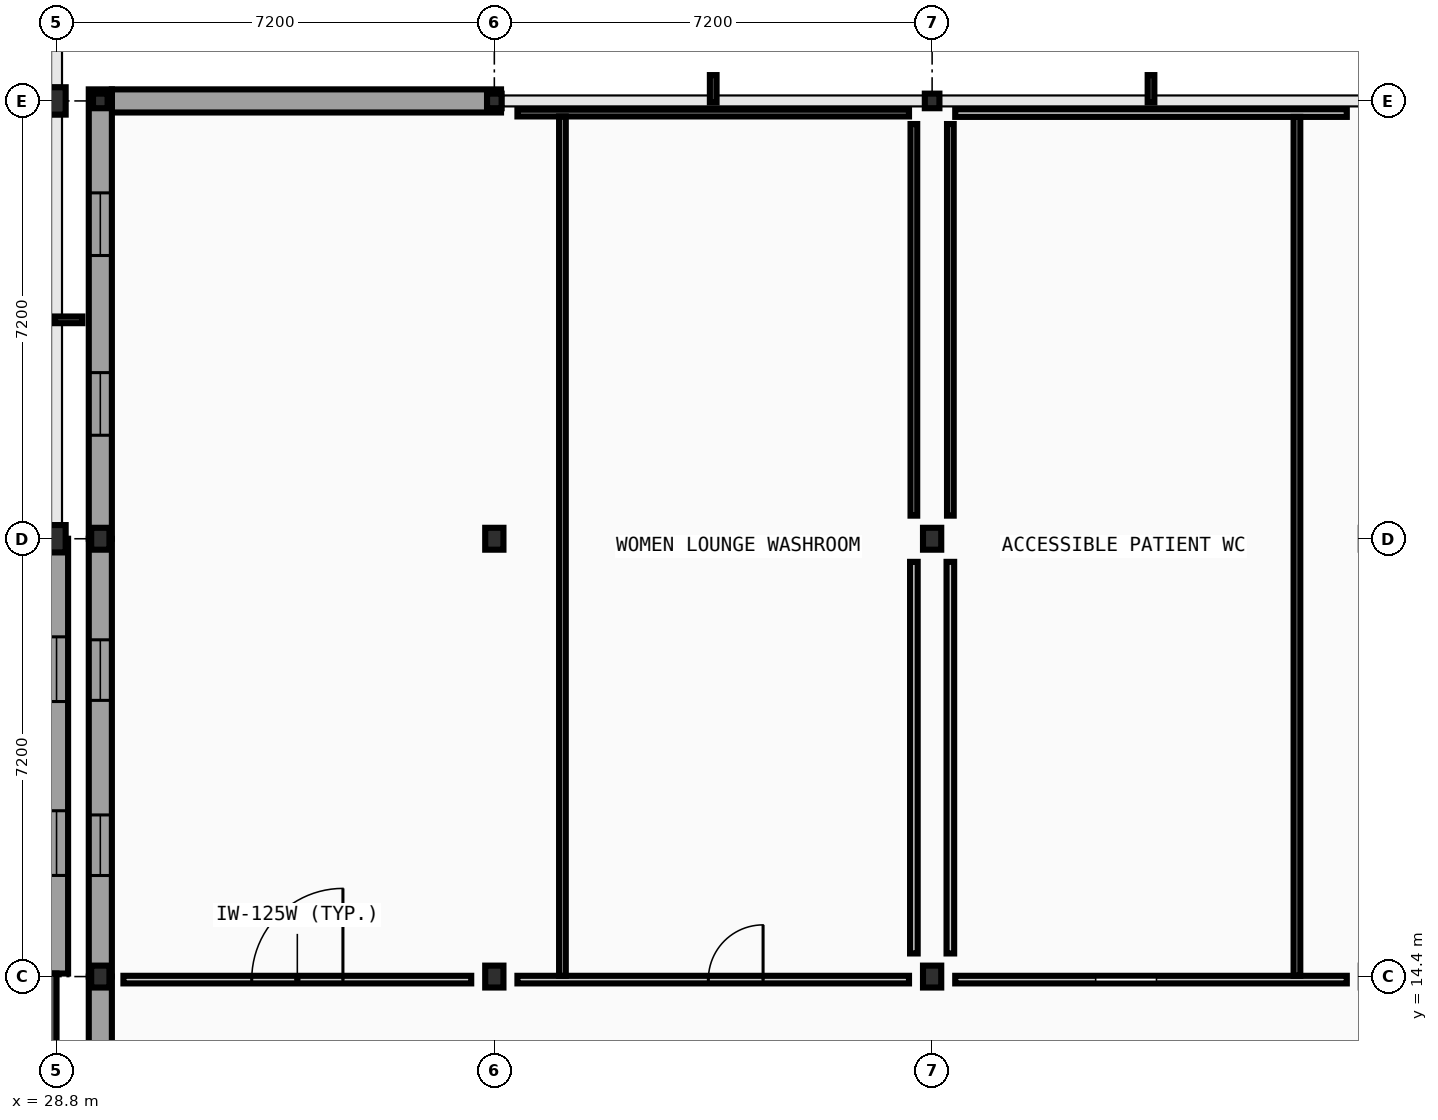
"""IFC4 building model, lengths in metres.
Left out: names, types, materials, properties, quantities, classifications, styles, units other than length and angle.
Written with IfcOpenShell. Run it as: python <this file> out.ifc"""

import sys

from ifc_helpers import new_model, si_unit, direction, frame, frame_2d, origin, origin_2d, place, context, subcontext, project, spatial, rectangle, i_section, extrude, element, fill, save


model = new_model("IFC4")
c1 = context("Model", 3, precision=1e-05, world=origin(), true_north=direction((0.0, 1.0)))
c2 = subcontext(c1, "Body", "Model", "MODEL_VIEW")
j1 = project(units=[si_unit("LENGTHUNIT", "METRE"), si_unit("PLANEANGLEUNIT", "RADIAN")], contexts=[c1])
p1 = place(None, origin())
s1 = spatial("IfcSite", under=j1, at=p1, CompositionType="ELEMENT")
p2 = place(p1, origin())
s2 = spatial("IfcBuilding", under=s1, at=p2, CompositionType="ELEMENT")
p3 = place(p2, frame((0.0, 0.0, 9.6)))
s3 = spatial("IfcBuildingStorey", under=s2, at=p3, CompositionType="ELEMENT", Elevation=9.6)
for number, where, z_axis, x_axis in (
    (1, (28.8, 21.6, 0.0), (0.0, 0.0, 1.0), (1.0, 0.0, 0.0)),
    (2, (28.8, 28.8, 0.0), (0.0, 0.0, 1.0), (1.0, 0.0, 0.0)),
):
    element("IfcColumn", number, at=place(p3, frame(where, z_axis=z_axis, x_axis=x_axis)), inside=s3, PredefinedType="COLUMN", context=c2, shape_type="SweptSolid", body=[
        extrude(i_section(OverallWidth=0.3, OverallDepth=0.45, WebThickness=0.014, FlangeThickness=0.026, FilletRadius=0.027, at=origin_2d()), origin(), (0.0, 0.0, 1.0), 4.4),
    ])
for number, where, z_axis, x_axis in (
    (3, (29.52, 14.4, 0.0), (0.0, 0.0, 1.0), (1.0, 0.0, 0.0)),
    (4, (29.52, 21.6, 0.0), (0.0, 0.0, 1.0), (1.0, 0.0, 0.0)),
):
    element("IfcColumn", number, at=place(p3, frame(where, z_axis=z_axis, x_axis=x_axis)), inside=s3, PredefinedType="COLUMN", context=c2, shape_type="SweptSolid", body=[
        extrude(i_section(OverallWidth=0.3, OverallDepth=0.36, WebThickness=0.012, FlangeThickness=0.022, FilletRadius=0.027, at=origin_2d()), origin(), (0.0, 0.0, 1.0), 4.4),
    ])
p4 = place(p3, frame((29.52, 28.8, 0.0), z_axis=(0.0, 0.0, 1.0), x_axis=(1.0, 0.0, 0.0)))
e5 = element("IfcColumn", 5, at=p4, inside=s3, PredefinedType="COLUMN", context=c2, shape_type="SweptSolid", body=[
    extrude(i_section(OverallWidth=0.24, OverallDepth=0.24, WebThickness=0.01, FlangeThickness=0.017, FilletRadius=0.021, at=origin_2d()), origin(), (0.0, 0.0, 1.0), 4.4),
])
for number, where, z_axis, x_axis in (
    (6, (36.0, 14.4, 0.0), (0.0, 0.0, 1.0), (1.0, 0.0, 0.0)),
    (7, (36.0, 21.6, 0.0), (0.0, 0.0, 1.0), (1.0, 0.0, 0.0)),
):
    element("IfcColumn", number, at=place(p3, frame(where, z_axis=z_axis, x_axis=x_axis)), inside=s3, PredefinedType="COLUMN", context=c2, shape_type="SweptSolid", body=[
        extrude(i_section(OverallWidth=0.3, OverallDepth=0.36, WebThickness=0.012, FlangeThickness=0.022, FilletRadius=0.027, at=origin_2d()), origin(), (0.0, 0.0, 1.0), 4.4),
    ])
p5 = place(p3, frame((36.0, 28.8, 0.0), z_axis=(0.0, 0.0, 1.0), x_axis=(1.0, 0.0, 0.0)))
e8 = element("IfcColumn", 8, at=p5, inside=s3, PredefinedType="COLUMN", context=c2, shape_type="SweptSolid", body=[
    extrude(i_section(OverallWidth=0.24, OverallDepth=0.24, WebThickness=0.01, FlangeThickness=0.017, FilletRadius=0.021, at=origin_2d()), origin(), (0.0, 0.0, 1.0), 4.4),
])
for number, where, z_axis, x_axis in (
    (9, (43.2, 14.4, 0.0), (0.0, 0.0, 1.0), (1.0, 0.0, 0.0)),
    (10, (43.2, 21.6, 0.0), (0.0, 0.0, 1.0), (1.0, 0.0, 0.0)),
):
    element("IfcColumn", number, at=place(p3, frame(where, z_axis=z_axis, x_axis=x_axis)), inside=s3, PredefinedType="COLUMN", context=c2, shape_type="SweptSolid", body=[
        extrude(i_section(OverallWidth=0.3, OverallDepth=0.36, WebThickness=0.012, FlangeThickness=0.022, FilletRadius=0.027, at=origin_2d()), origin(), (0.0, 0.0, 1.0), 4.4),
    ])
p6 = place(p3, frame((43.2, 28.8, 0.0), z_axis=(0.0, 0.0, 1.0), x_axis=(1.0, 0.0, 0.0)))
e11 = element("IfcColumn", 11, at=p6, inside=s3, PredefinedType="COLUMN", context=c2, shape_type="SweptSolid", body=[
    extrude(i_section(OverallWidth=0.24, OverallDepth=0.24, WebThickness=0.01, FlangeThickness=0.017, FilletRadius=0.021, at=origin_2d()), origin(), (0.0, 0.0, 1.0), 4.4),
])
p7 = place(p3, frame((28.8, 14.45, 0.0), z_axis=(0.0, 0.0, 1.0), x_axis=(0.0, 1.0, 0.0)))
e12 = element("IfcWall", 12, at=p7, inside=s3, PredefinedType="STANDARD", context=c2, shape_type="SweptSolid", body=[
    extrude(rectangle(XDim=7.15, YDim=0.38, at=frame_2d((3.575, 0.0))), origin(), (0.0, 0.0, 1.0), 4.2),
])
p8 = place(p7, frame((1.613, 0.0, 0.95)))
e13 = element("IfcOpeningElement", 13, at=p8, cuts=e12, PredefinedType="OPENING", context=c2, shape_type="SweptSolid", body=[
    extrude(rectangle(XDim=1.064, YDim=1.332, at=frame_2d((0.532, 0.666))), frame((0.0, 0.2, 0.0), z_axis=(0.0, -1.0, 0.0), x_axis=(1.0, 0.0, 0.0)), (0.0, 0.0, 1.0), 0.4),
])
p9 = place(p7, frame((4.473, 0.0, 0.95)))
e14 = element("IfcOpeningElement", 14, at=p9, cuts=e12, PredefinedType="OPENING", context=c2, shape_type="SweptSolid", body=[
    extrude(rectangle(XDim=1.064, YDim=1.332, at=frame_2d((0.532, 0.666))), frame((0.0, 0.2, 0.0), z_axis=(0.0, -1.0, 0.0), x_axis=(1.0, 0.0, 0.0)), (0.0, 0.0, 1.0), 0.4),
])
p10 = place(p3, frame((36.11, 28.8, 0.0), z_axis=(0.0, 0.0, 1.0), x_axis=(-1.0, 0.0, 0.0)))
e15 = element("IfcWall", 15, at=p10, inside=s3, PredefinedType="STANDARD", context=c2, shape_type="SweptSolid", body=[
    extrude(rectangle(XDim=6.4, YDim=0.38, at=frame_2d((3.2, 0.0))), origin(), (0.0, 0.0, 1.0), 3.9),
])
p11 = place(p3, frame((29.52, 14.4, 0.0), z_axis=(0.0, 0.0, 1.0), x_axis=(0.0, -1.0, 0.0)))
e16 = element("IfcWall", 16, at=p11, inside=s3, PredefinedType="STANDARD", context=c2, shape_type="SweptSolid", body=[
    extrude(rectangle(XDim=5.5, YDim=0.38, at=frame_2d((2.75, 0.0))), origin(), (0.0, 0.0, 1.0), 4.2),
])
p12 = place(p3, frame((29.52, 21.6, 0.0), z_axis=(0.0, 0.0, 1.0), x_axis=(0.0, -1.0, 0.0)))
e17 = element("IfcWall", 17, at=p12, inside=s3, PredefinedType="STANDARD", context=c2, shape_type="SweptSolid", body=[
    extrude(rectangle(XDim=7.2, YDim=0.38, at=frame_2d((3.6, 0.0))), origin(), (0.0, 0.0, 1.0), 3.895),
])
p13 = place(p12, frame((1.662, 0.0, 0.95)))
e18 = element("IfcOpeningElement", 18, at=p13, cuts=e17, PredefinedType="OPENING", context=c2, shape_type="SweptSolid", body=[
    extrude(rectangle(XDim=0.996, YDim=1.368, at=frame_2d((0.498, 0.684))), frame((0.0, 0.2, 0.0), z_axis=(0.0, -1.0, 0.0), x_axis=(1.0, 0.0, 0.0)), (0.0, 0.0, 1.0), 0.4),
])
p14 = place(p12, frame((4.542, 0.0, 0.95)))
e19 = element("IfcOpeningElement", 19, at=p14, cuts=e17, PredefinedType="OPENING", context=c2, shape_type="SweptSolid", body=[
    extrude(rectangle(XDim=0.996, YDim=1.368, at=frame_2d((0.498, 0.684))), frame((0.0, 0.2, 0.0), z_axis=(0.0, -1.0, 0.0), x_axis=(1.0, 0.0, 0.0)), (0.0, 0.0, 1.0), 0.4),
])
p15 = place(p3, frame((29.52, 28.99, 0.0), z_axis=(0.0, 0.0, 1.0), x_axis=(0.0, -1.0, 0.0)))
e20 = element("IfcWall", 20, at=p15, inside=s3, PredefinedType="STANDARD", context=c2, shape_type="SweptSolid", body=[
    extrude(rectangle(XDim=7.39, YDim=0.38, at=frame_2d((3.695, 0.0))), origin(), (0.0, 0.0, 1.0), 3.9),
])
p16 = place(p15, frame((1.702, 0.0, 0.95)))
e21 = element("IfcOpeningElement", 21, at=p16, cuts=e20, PredefinedType="OPENING", context=c2, shape_type="SweptSolid", body=[
    extrude(rectangle(XDim=1.03, YDim=1.368, at=frame_2d((0.515, 0.684))), frame((0.0, 0.2, 0.0), z_axis=(0.0, -1.0, 0.0), x_axis=(1.0, 0.0, 0.0)), (0.0, 0.0, 1.0), 0.4),
])
p17 = place(p15, frame((4.658, 0.0, 0.95)))
e22 = element("IfcOpeningElement", 22, at=p17, cuts=e20, PredefinedType="OPENING", context=c2, shape_type="SweptSolid", body=[
    extrude(rectangle(XDim=1.03, YDim=1.368, at=frame_2d((0.515, 0.684))), frame((0.0, 0.2, 0.0), z_axis=(0.0, -1.0, 0.0), x_axis=(1.0, 0.0, 0.0)), (0.0, 0.0, 1.0), 0.4),
])
p18 = place(p3, frame((28.6, 5.85, 0.0), z_axis=(0.0, 0.0, 1.0), x_axis=(0.0, 1.0, 0.0)))
e23 = element("IfcWall", 23, at=p18, inside=s3, PredefinedType="SHEAR", context=c2, shape_type="SweptSolid", body=[
    extrude(rectangle(XDim=8.6, YDim=0.4, at=frame_2d((4.3, 0.0))), origin(), (0.0, 0.0, 1.0), 4.2),
])
p19 = place(p3, frame((29.9, 14.35, 0.0), z_axis=(0.0, 0.0, 1.0), x_axis=(1.0, 0.0, 0.0)))
e24 = element("IfcWall", 24, at=p19, inside=s3, PredefinedType="PARTITIONING", context=c2, shape_type="SweptSolid", body=[
    extrude(rectangle(XDim=5.72, YDim=0.125, at=frame_2d((2.86, 0.0))), origin(), (0.0, 0.0, 1.0), 3.895),
])
p20 = place(p19, frame((2.11, 0.0, 0.0)))
e25 = element("IfcOpeningElement", 25, at=p20, cuts=e24, PredefinedType="OPENING", context=c2, shape_type="SweptSolid", body=[
    extrude(rectangle(XDim=1.5, YDim=2.2, at=frame_2d((0.75, 1.1))), frame((0.0, 0.073, 0.0), z_axis=(0.0, -1.0, 0.0), x_axis=(1.0, 0.0, 0.0)), (0.0, 0.0, 1.0), 0.145),
])
p21 = place(p3, frame((36.38, 14.35, 0.0), z_axis=(0.0, 0.0, 1.0), x_axis=(1.0, 0.0, 0.0)))
e26 = element("IfcWall", 26, at=p21, inside=s3, PredefinedType="PARTITIONING", context=c2, shape_type="SweptSolid", body=[
    extrude(rectangle(XDim=6.44, YDim=0.125, at=frame_2d((3.22, 0.0))), origin(), (0.0, 0.0, 1.0), 3.895),
])
p22 = place(p21, frame((3.14, 0.0, 0.0)))
e27 = element("IfcOpeningElement", 27, at=p22, cuts=e26, PredefinedType="OPENING", context=c2, shape_type="SweptSolid", body=[
    extrude(rectangle(XDim=0.9, YDim=2.1, at=frame_2d((0.45, 1.05))), frame((0.0, 0.073, 0.0), z_axis=(0.0, -1.0, 0.0), x_axis=(1.0, 0.0, 0.0)), (0.0, 0.0, 1.0), 0.145),
])
p23 = place(p3, frame((43.58, 14.35, 0.0), z_axis=(0.0, 0.0, 1.0), x_axis=(1.0, 0.0, 0.0)))
e28 = element("IfcWall", 28, at=p23, inside=s3, PredefinedType="PARTITIONING", context=c2, shape_type="SweptSolid", body=[
    extrude(rectangle(XDim=6.44, YDim=0.125, at=frame_2d((3.22, 0.0))), origin(), (0.0, 0.0, 1.0), 3.895),
])
p24 = place(p23, frame((2.31, 0.0, 0.0)))
e29 = element("IfcOpeningElement", 29, at=p24, cuts=e28, PredefinedType="OPENING", context=c2, shape_type="SweptSolid", body=[
    extrude(rectangle(XDim=1.0, YDim=2.1, at=frame_2d((0.5, 1.05))), frame((0.0, 0.073, 0.0), z_axis=(0.0, -1.0, 0.0), x_axis=(1.0, 0.0, 0.0)), (0.0, 0.0, 1.0), 0.145),
])
p25 = place(p3, frame((36.38, 28.6, 0.0), z_axis=(0.0, 0.0, 1.0), x_axis=(1.0, 0.0, 0.0)))
e30 = element("IfcWall", 30, at=p25, inside=s3, PredefinedType="PARTITIONING", context=c2, shape_type="SweptSolid", body=[
    extrude(rectangle(XDim=6.44, YDim=0.11, at=frame_2d((3.22, 0.0))), origin(), (0.0, 0.0, 1.0), 3.9),
])
p26 = place(p3, frame((43.58, 28.6, 0.0), z_axis=(0.0, 0.0, 1.0), x_axis=(1.0, 0.0, 0.0)))
e31 = element("IfcWall", 31, at=p26, inside=s3, PredefinedType="PARTITIONING", context=c2, shape_type="SweptSolid", body=[
    extrude(rectangle(XDim=6.44, YDim=0.125, at=frame_2d((3.22, 0.0))), origin(), (0.0, 0.0, 1.0), 3.9),
])
p27 = place(p3, frame((37.12, 14.413, 0.0), z_axis=(0.0, 0.0, 1.0), x_axis=(0.0, 1.0, 0.0)))
e32 = element("IfcWall", 32, at=p27, inside=s3, PredefinedType="PARTITIONING", context=c2, shape_type="SweptSolid", body=[
    extrude(rectangle(XDim=14.132, YDim=0.11, at=frame_2d((7.066, 0.0))), origin(), (0.0, 0.0, 1.0), 4.2),
])
p28 = place(p3, frame((42.9, 14.78, 0.0), z_axis=(0.0, 0.0, 1.0), x_axis=(0.0, 1.0, 0.0)))
e33 = element("IfcWall", 33, at=p28, inside=s3, PredefinedType="PARTITIONING", context=c2, shape_type="SweptSolid", body=[
    extrude(rectangle(XDim=6.44, YDim=0.125, at=frame_2d((3.22, 0.0))), origin(), (0.0, 0.0, 1.0), 4.2),
])
p29 = place(p3, frame((42.9, 21.98, 0.0), z_axis=(0.0, 0.0, 1.0), x_axis=(0.0, 1.0, 0.0)))
e34 = element("IfcWall", 34, at=p29, inside=s3, PredefinedType="PARTITIONING", context=c2, shape_type="SweptSolid", body=[
    extrude(rectangle(XDim=6.44, YDim=0.11, at=frame_2d((3.22, 0.0))), origin(), (0.0, 0.0, 1.0), 4.2),
])
p30 = place(p3, frame((43.5, 14.78, 0.0), z_axis=(0.0, 0.0, 1.0), x_axis=(0.0, 1.0, 0.0)))
e35 = element("IfcWall", 35, at=p30, inside=s3, PredefinedType="PARTITIONING", context=c2, shape_type="SweptSolid", body=[
    extrude(rectangle(XDim=6.44, YDim=0.125, at=frame_2d((3.22, 0.0))), origin(), (0.0, 0.0, 1.0), 4.2),
])
p31 = place(p3, frame((43.5, 21.98, 0.0), z_axis=(0.0, 0.0, 1.0), x_axis=(0.0, 1.0, 0.0)))
e36 = element("IfcWall", 36, at=p31, inside=s3, PredefinedType="PARTITIONING", context=c2, shape_type="SweptSolid", body=[
    extrude(rectangle(XDim=6.44, YDim=0.11, at=frame_2d((3.22, 0.0))), origin(), (0.0, 0.0, 1.0), 4.2),
])
p32 = place(p3, frame((49.2, 14.413, 0.0), z_axis=(0.0, 0.0, 1.0), x_axis=(0.0, 1.0, 0.0)))
e37 = element("IfcWall", 37, at=p32, inside=s3, PredefinedType="PARTITIONING", context=c2, shape_type="SweptSolid", body=[
    extrude(rectangle(XDim=14.125, YDim=0.11, at=frame_2d((7.062, 0.0))), origin(), (0.0, 0.0, 1.0), 4.2),
])
p33 = place(p8, origin())
e38 = element("IfcWindow", 38, at=p33, inside=s3, PartitioningType="SINGLE_PANEL", PredefinedType="WINDOW", context=c2, shape_type="SweptSolid", body=[
    extrude(rectangle(XDim=1.064, YDim=1.332, at=frame_2d((0.532, 0.666))), frame((0.0, 0.03, 0.0), z_axis=(0.0, -1.0, 0.0), x_axis=(1.0, 0.0, 0.0)), (0.0, 0.0, 1.0), 0.06),
])
fill(e13, e38)
p34 = place(p9, origin())
e39 = element("IfcWindow", 39, at=p34, inside=s3, PartitioningType="SINGLE_PANEL", PredefinedType="WINDOW", context=c2, shape_type="SweptSolid", body=[
    extrude(rectangle(XDim=1.064, YDim=1.332, at=frame_2d((0.532, 0.666))), frame((0.0, 0.03, 0.0), z_axis=(0.0, -1.0, 0.0), x_axis=(1.0, 0.0, 0.0)), (0.0, 0.0, 1.0), 0.06),
])
fill(e14, e39)
p35 = place(p13, origin())
e40 = element("IfcWindow", 40, at=p35, inside=s3, PartitioningType="SINGLE_PANEL", PredefinedType="WINDOW", context=c2, shape_type="SweptSolid", body=[
    extrude(rectangle(XDim=0.996, YDim=1.368, at=frame_2d((0.498, 0.684))), frame((0.0, 0.03, 0.0), z_axis=(0.0, -1.0, 0.0), x_axis=(1.0, 0.0, 0.0)), (0.0, 0.0, 1.0), 0.06),
])
fill(e18, e40)
p36 = place(p14, origin())
e41 = element("IfcWindow", 41, at=p36, inside=s3, PartitioningType="SINGLE_PANEL", PredefinedType="WINDOW", context=c2, shape_type="SweptSolid", body=[
    extrude(rectangle(XDim=0.996, YDim=1.368, at=frame_2d((0.498, 0.684))), frame((0.0, 0.03, 0.0), z_axis=(0.0, -1.0, 0.0), x_axis=(1.0, 0.0, 0.0)), (0.0, 0.0, 1.0), 0.06),
])
fill(e19, e41)
p37 = place(p16, origin())
e42 = element("IfcWindow", 42, at=p37, inside=s3, PartitioningType="SINGLE_PANEL", PredefinedType="WINDOW", context=c2, shape_type="SweptSolid", body=[
    extrude(rectangle(XDim=1.03, YDim=1.368, at=frame_2d((0.515, 0.684))), frame((0.0, 0.03, 0.0), z_axis=(0.0, -1.0, 0.0), x_axis=(1.0, 0.0, 0.0)), (0.0, 0.0, 1.0), 0.06),
])
fill(e21, e42)
p38 = place(p17, origin())
e43 = element("IfcWindow", 43, at=p38, inside=s3, PartitioningType="SINGLE_PANEL", PredefinedType="WINDOW", context=c2, shape_type="SweptSolid", body=[
    extrude(rectangle(XDim=1.03, YDim=1.368, at=frame_2d((0.515, 0.684))), frame((0.0, 0.03, 0.0), z_axis=(0.0, -1.0, 0.0), x_axis=(1.0, 0.0, 0.0)), (0.0, 0.0, 1.0), 0.06),
])
fill(e22, e43)
p39 = place(p24, frame((1.0, 0.0, 0.0), z_axis=(0.0, 0.0, 1.0), x_axis=(-1.0, 0.0, 0.0)))
e44 = element("IfcDoor", 44, at=p39, inside=s3, OperationType="SLIDING_TO_LEFT", PredefinedType="DOOR", context=c2, shape_type="SweptSolid", body=[
    extrude(rectangle(XDim=1.0, YDim=2.1, at=frame_2d((0.5, 1.05))), frame((0.0, 0.025, 0.0), z_axis=(0.0, -1.0, 0.0), x_axis=(1.0, 0.0, 0.0)), (0.0, 0.0, 1.0), 0.05),
])
fill(e29, e44)
p40 = place(p22, frame((0.9, 0.0, 0.0), z_axis=(0.0, 0.0, 1.0), x_axis=(-1.0, 0.0, 0.0)))
e45 = element("IfcDoor", 45, at=p40, inside=s3, OperationType="SINGLE_SWING_RIGHT", PredefinedType="DOOR", context=c2, shape_type="SweptSolid", body=[
    extrude(rectangle(XDim=0.9, YDim=2.1, at=frame_2d((0.45, 1.05))), frame((0.0, 0.025, 0.0), z_axis=(0.0, -1.0, 0.0), x_axis=(1.0, 0.0, 0.0)), (0.0, 0.0, 1.0), 0.05),
])
fill(e27, e45)
p41 = place(p20, frame((1.5, 0.0, 0.0), z_axis=(0.0, 0.0, 1.0), x_axis=(-1.0, 0.0, 0.0)))
e46 = element("IfcDoor", 46, at=p41, inside=s3, OperationType="DOUBLE_DOOR_SINGLE_SWING", PredefinedType="DOOR", context=c2, shape_type="SweptSolid", body=[
    extrude(rectangle(XDim=1.5, YDim=2.2, at=frame_2d((0.75, 1.1))), frame((0.0, 0.025, 0.0), z_axis=(0.0, -1.0, 0.0), x_axis=(1.0, 0.0, 0.0)), (0.0, 0.0, 1.0), 0.05),
])
fill(e25, e46)
save(model, sys.argv[1])
